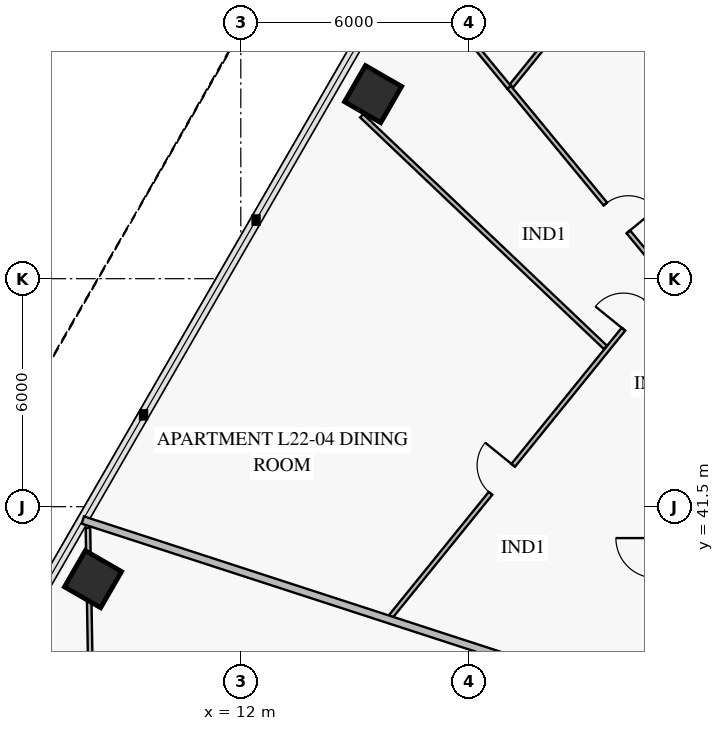
"""IFC4 building model, lengths in metres.
Left out: names, types, materials, properties, quantities, classifications, styles, units other than length and angle.
Written with IfcOpenShell. Run it as: python <this file> out.ifc"""

import sys

from ifc_helpers import new_model, si_unit, direction, frame, frame_2d, origin, origin_2d, place, context, subcontext, project, spatial, rectangle, extrude, element, fill, save


model = new_model("IFC4")
c1 = context("Model", 3, precision=1e-05, world=origin(), true_north=direction((0.0, 1.0)))
c2 = subcontext(c1, "Body", "Model", "MODEL_VIEW")
j1 = project(units=[si_unit("LENGTHUNIT", "METRE"), si_unit("PLANEANGLEUNIT", "RADIAN")], contexts=[c1])
p1 = place(None, origin())
s1 = spatial("IfcSite", under=j1, at=p1, CompositionType="ELEMENT")
p2 = place(p1, origin())
s2 = spatial("IfcBuilding", under=s1, at=p2, CompositionType="ELEMENT")
p3 = place(p2, frame((0.0, 0.0, 92.4)))
s3 = spatial("IfcBuildingStorey", under=s2, at=p3, CompositionType="ELEMENT", Elevation=92.4)
for number, where, z_axis, x_axis in (
    (1, (15.481, 52.357, 0.0), (0.0, 0.0, 1.0), (-0.5, -0.866, 0.0)),
    (2, (8.111, 39.592, 0.0), (0.0, 0.0, 1.0), (-0.5, -0.866, 0.0)),
):
    element("IfcColumn", number, at=place(p3, frame(where, z_axis=z_axis, x_axis=x_axis)), inside=s3, PredefinedType="COLUMN", context=c2, shape_type="SweptSolid", body=[
        extrude(rectangle(XDim=1.1, YDim=1.1, at=origin_2d()), origin(), (0.0, 0.0, 1.0), 3.55),
    ])
p4 = place(p3, frame((23.244, 47.621, 0.0), z_axis=(0.0, 0.0, 1.0), x_axis=(-0.629321725732, -0.777144880651, 0.0)))
e3 = element("IfcWall", 3, at=p4, inside=s3, PredefinedType="PARTITIONING", context=c2, shape_type="SweptSolid", body=[
    extrude(rectangle(XDim=11.601, YDim=0.12, at=frame_2d((5.8, 0.0))), origin(), (0.0, 0.0, 1.0), 2.85),
])
p5 = place(p4, frame((0.916, 0.0, 0.0)))
e4 = element("IfcOpeningElement", 4, at=p5, cuts=e3, PredefinedType="OPENING", context=c2, shape_type="SweptSolid", body=[
    extrude(rectangle(XDim=0.95, YDim=2.1, at=frame_2d((0.475, 1.05))), frame((0.0, 0.072, 0.0), z_axis=(0.0, -1.0, 0.0), x_axis=(1.0, 0.0, 0.0)), (0.0, 0.0, 1.0), 0.144),
])
p6 = place(p4, frame((6.476, 0.0, 0.0)))
e5 = element("IfcOpeningElement", 5, at=p6, cuts=e3, PredefinedType="OPENING", context=c2, shape_type="SweptSolid", body=[
    extrude(rectangle(XDim=0.95, YDim=2.1, at=frame_2d((0.475, 1.05))), frame((0.0, 0.072, 0.0), z_axis=(0.0, -1.0, 0.0), x_axis=(1.0, 0.0, 0.0)), (0.0, 0.0, 1.0), 0.144),
])
p7 = place(p3, frame((23.135, 47.595, 0.0), z_axis=(0.0, 0.0, 1.0), x_axis=(-0.636375017003, 0.77137982715, 0.0)))
e6 = element("IfcWall", 6, at=p7, inside=s3, PredefinedType="PARTITIONING", context=c2, shape_type="SweptSolid", body=[
    extrude(rectangle(XDim=6.405, YDim=0.12, at=frame_2d((3.203, 0.0))), origin(), (0.0, 0.0, 1.0), 3.1),
])
p8 = place(p7, frame((1.474, 0.0, 0.0)))
e7 = element("IfcOpeningElement", 7, at=p8, cuts=e6, PredefinedType="OPENING", context=c2, shape_type="SweptSolid", body=[
    extrude(rectangle(XDim=0.95, YDim=2.1, at=frame_2d((0.475, 1.05))), frame((0.0, 0.072, 0.0), z_axis=(0.0, -1.0, 0.0), x_axis=(1.0, 0.0, 0.0)), (0.0, 0.0, 1.0), 0.144),
])
p9 = place(p3, frame((21.944, 56.059, 0.0), z_axis=(0.0, 0.0, 1.0), x_axis=(-0.629293659157, -0.777167607756, 0.0)))
e8 = element("IfcWall", 8, at=p9, inside=s3, PredefinedType="PARTITIONING", context=c2, shape_type="SweptSolid", body=[
    extrude(rectangle(XDim=4.489, YDim=0.12, at=frame_2d((2.245, 0.0))), origin(), (0.0, 0.0, 1.0), 2.8),
])
p10 = place(p9, frame((1.855, 0.0, 0.0)))
e9 = element("IfcOpeningElement", 9, at=p10, cuts=e8, PredefinedType="OPENING", context=c2, shape_type="SweptSolid", body=[
    extrude(rectangle(XDim=0.95, YDim=2.1, at=frame_2d((0.475, 1.05))), frame((0.0, 0.072, 0.0), z_axis=(0.0, -1.0, 0.0), x_axis=(1.0, 0.0, 0.0)), (0.0, 0.0, 1.0), 0.144),
])
p11 = place(p3, frame((8.011, 39.021, 0.0), z_axis=(0.0, 0.0, 1.0), x_axis=(0.017441359141, -0.999847887927, 0.0)))
e10 = element("IfcWall", 10, at=p11, inside=s3, PredefinedType="PARTITIONING", context=c2, shape_type="SweptSolid", body=[
    extrude(rectangle(XDim=5.277, YDim=0.12, at=frame_2d((2.639, 0.0))), origin(), (0.0, 0.0, 1.0), 2.8),
])
p12 = place(p11, frame((2.248, 0.0, 0.0)))
e11 = element("IfcOpeningElement", 11, at=p12, cuts=e10, PredefinedType="OPENING", context=c2, shape_type="SweptSolid", body=[
    extrude(rectangle(XDim=0.95, YDim=2.1, at=frame_2d((0.475, 1.05))), frame((0.0, 0.072, 0.0), z_axis=(0.0, -1.0, 0.0), x_axis=(1.0, 0.0, 0.0)), (0.0, 0.0, 1.0), 0.144),
])
p13 = place(p3, frame((29.049, 44.04, 0.0), z_axis=(0.0, 0.0, 1.0), x_axis=(-0.499993398997, 0.866029214842, 0.0)))
e12 = element("IfcWall", 12, at=p13, inside=s3, PredefinedType="PARTITIONING", context=c2, shape_type="SweptSolid", body=[
    extrude(rectangle(XDim=18.98, YDim=0.2, at=frame_2d((9.49, 0.0))), origin(), (0.0, 0.0, 1.0), 2.8),
])
p14 = place(p3, frame((21.594, 45.692, 0.0), z_axis=(0.0, 0.0, 1.0), x_axis=(-0.724829920805, 0.688927852467, 0.0)))
e13 = element("IfcWall", 13, at=p14, inside=s3, PredefinedType="PARTITIONING", context=c2, shape_type="SweptSolid", body=[
    extrude(rectangle(XDim=8.847, YDim=0.12, at=frame_2d((4.423, 0.0))), origin(), (0.0, 0.0, 1.0), 2.8),
])
p15 = place(p3, frame((19.059, 52.536, 0.0), z_axis=(0.0, 0.0, 1.0), x_axis=(-0.636324617316, 0.771421403254, 0.0)))
e14 = element("IfcWall", 14, at=p15, inside=s3, PredefinedType="PARTITIONING", context=c2, shape_type="SweptSolid", body=[
    extrude(rectangle(XDim=4.296, YDim=0.12, at=frame_2d((2.148, 0.0))), origin(), (0.0, 0.0, 1.0), 2.8),
])
p16 = place(p3, frame((22.96, 36.237, 0.0), z_axis=(0.0, 0.0, 1.0), x_axis=(-0.95105675479, 0.309016260362, 0.0)))
e15 = element("IfcWall", 15, at=p16, inside=s3, PredefinedType="PARTITIONING", context=c2, shape_type="SweptSolid", body=[
    extrude(rectangle(XDim=15.894, YDim=0.2, at=frame_2d((7.947, 0.0))), origin(), (0.0, 0.0, 1.0), 2.8),
])
p17 = place(p3, frame((7.978, 40.94, 0.0), z_axis=(0.0, 0.0, 1.0), x_axis=(0.017557656864, -0.999845852462, 0.0)))
e16 = element("IfcWall", 16, at=p17, inside=s3, PredefinedType="PARTITIONING", context=c2, shape_type="SweptSolid", body=[
    extrude(rectangle(XDim=0.779, YDim=0.12, at=frame_2d((0.389, 0.0))), origin(), (0.0, 0.0, 1.0), 3.55),
])
p18 = place(p5, frame((0.95, 0.0, 0.0), z_axis=(0.0, 0.0, 1.0), x_axis=(-1.0, 0.0, 0.0)))
e17 = element("IfcDoor", 17, at=p18, inside=s3, OperationType="SINGLE_SWING_LEFT", PredefinedType="DOOR", context=c2, shape_type="SweptSolid", body=[
    extrude(rectangle(XDim=0.95, YDim=2.1, at=frame_2d((0.475, 1.05))), frame((0.0, 0.025, 0.0), z_axis=(0.0, -1.0, 0.0), x_axis=(1.0, 0.0, 0.0)), (0.0, 0.0, 1.0), 0.05),
])
fill(e4, e17)
p19 = place(p6, frame((0.95, 0.0, 0.0), z_axis=(0.0, 0.0, 1.0), x_axis=(-1.0, 0.0, 0.0)))
e18 = element("IfcDoor", 18, at=p19, inside=s3, OperationType="SINGLE_SWING_RIGHT", PredefinedType="DOOR", context=c2, shape_type="SweptSolid", body=[
    extrude(rectangle(XDim=0.95, YDim=2.1, at=frame_2d((0.475, 1.05))), frame((0.0, 0.025, 0.0), z_axis=(0.0, -1.0, 0.0), x_axis=(1.0, 0.0, 0.0)), (0.0, 0.0, 1.0), 0.05),
])
fill(e5, e18)
p20 = place(p8, frame((0.95, 0.0, 0.0), z_axis=(0.0, 0.0, 1.0), x_axis=(-1.0, 0.0, 0.0)))
e19 = element("IfcDoor", 19, at=p20, inside=s3, OperationType="SINGLE_SWING_RIGHT", PredefinedType="DOOR", context=c2, shape_type="SweptSolid", body=[
    extrude(rectangle(XDim=0.95, YDim=2.1, at=frame_2d((0.475, 1.05))), frame((0.0, 0.025, 0.0), z_axis=(0.0, -1.0, 0.0), x_axis=(1.0, 0.0, 0.0)), (0.0, 0.0, 1.0), 0.05),
])
fill(e7, e19)
save(model, sys.argv[1])
